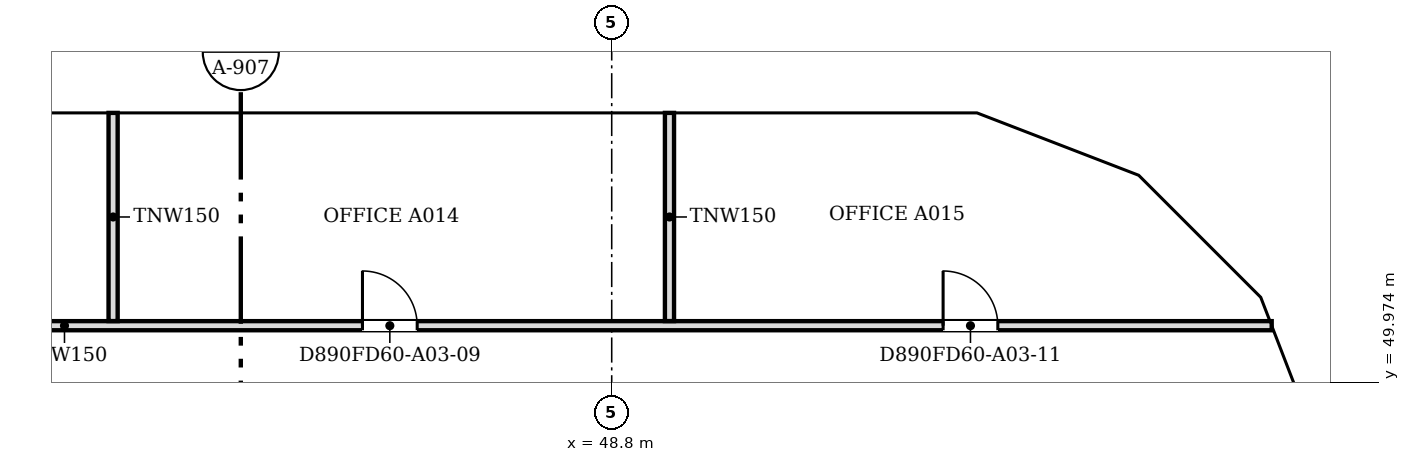
"""IFC4 building model, lengths in metres.
Left out: names, types, materials, properties, quantities, classifications, styles, units other than length and angle.
Written with IfcOpenShell. Run it as: python <this file> out.ifc"""

import sys

from ifc_helpers import new_model, si_unit, direction, frame, frame_2d, origin, place, context, subcontext, project, spatial, polyline, rectangle, outline, extrude, faceted_brep, source, transform, mapped, element, fill, save


model = new_model("IFC4")
c1 = context("Model", 3, precision=1e-05, world=origin(), true_north=direction((0.0, 1.0)))
c2 = subcontext(c1, "Body", "Model", "MODEL_VIEW")
j1 = project(units=[si_unit("LENGTHUNIT", "METRE"), si_unit("PLANEANGLEUNIT", "RADIAN")], contexts=[c1])
p1 = place(None, origin())
s1 = spatial("IfcSite", under=j1, at=p1, CompositionType="ELEMENT")
p2 = place(p1, origin())
s2 = spatial("IfcBuilding", under=s1, at=p2, CompositionType="ELEMENT")
p3 = place(p2, frame((0.0, 0.0, 41.0)))
s3 = spatial("IfcBuildingStorey", under=s2, at=p3, CompositionType="ELEMENT", Elevation=41.0)
m1 = source(origin(), c2, "Body", "Brep", [
    faceted_brep([(2.95, -0.25, 0.0), (3.003, -0.25, 0.068), (3.003, -0.25, 7.532), (2.95, -0.25, 7.6), (0.0, -0.25, 3.8), (0.047, 0.25, 3.86), (2.898, 0.25, 7.532), (2.898, 0.25, 0.068), (0.047, 0.25, 3.74), (2.95, 0.0, 0.0), (2.95, 0.0, 7.6), (0.0, 0.0, 3.8)], [[[0, 1, 2, 3, 4]], [[5, 6, 7, 8]], [[1, 0, 9]], [[10, 3, 2]], [[6, 5, 11, 4, 3, 10]], [[8, 7, 9, 0, 4, 11]], [[8, 11, 5]], [[1, 9, 7, 6, 10, 2]]]),
])
p4 = place(p3, frame((60.75, 48.753, -3.8), z_axis=(0.0, 0.0, 1.0), x_axis=(-0.35992665181, 0.932980602862, 0.0)))
e1 = element("IfcWall", 1, at=p4, inside=s3, PredefinedType="SOLIDWALL", context=c2, shape_type="MappedRepresentation", body=[
    mapped(m1, transform((0.0, 0.0, 0.0), scale=1.0)),
])
m2 = source(origin(), c2, "Body", "SweptSolid", [
    extrude(outline(polyline([(2.75, 6.935), (0.316, 3.8), (2.75, 0.665), (2.75, 6.935)])), frame((0.0, 0.26, 0.0), z_axis=(0.0, -1.0, 0.0), x_axis=(1.0, 0.0, 0.0)), (0.0, 0.0, 1.0), 0.52),
])
p5 = place(p4, origin())
e2 = element("IfcOpeningElement", 2, at=p5, cuts=e1, PredefinedType="OPENING", context=c2, shape_type="MappedRepresentation", body=[
    mapped(m2, transform((0.0, 0.0, 0.0), scale=1.0)),
])
m3 = source(origin(), c2, "Body", "Brep", [
    faceted_brep([(0.053, -0.25, 0.0), (2.997, -0.25, 3.8), (0.053, -0.25, 7.6), (0.0, -0.25, 7.532), (0.0, -0.25, 0.068), (0.106, 0.25, 7.532), (2.944, 0.25, 3.868), (2.944, 0.25, 3.732), (0.106, 0.25, 0.068), (2.997, 0.0, 3.8), (0.053, 0.0, 0.0), (0.053, 0.0, 7.6)], [[[0, 1, 2, 3, 4]], [[5, 6, 7, 8]], [[8, 7, 9, 1, 0, 10]], [[6, 5, 11, 2, 1, 9]], [[3, 2, 11]], [[10, 0, 4]], [[8, 10, 4, 3, 11, 5]], [[9, 7, 6]]]),
])
p6 = place(p3, frame((59.726, 51.469, -3.8), z_axis=(0.0, 0.0, 1.0), x_axis=(-0.707106781187, 0.707106781187, 0.0)))
e3 = element("IfcWall", 3, at=p6, inside=s3, PredefinedType="SOLIDWALL", context=c2, shape_type="MappedRepresentation", body=[
    mapped(m3, transform((0.0, 0.0, 0.0), scale=1.0)),
])
m4 = source(origin(), c2, "Body", "SweptSolid", [
    extrude(outline(polyline([(0.253, 0.666), (2.681, 3.8), (0.253, 6.934), (0.253, 0.666)])), frame((0.0, 0.26, 0.0), z_axis=(0.0, -1.0, 0.0), x_axis=(1.0, 0.0, 0.0)), (0.0, 0.0, 1.0), 0.52),
])
p7 = place(p6, origin())
e4 = element("IfcOpeningElement", 4, at=p7, cuts=e3, PredefinedType="OPENING", context=c2, shape_type="MappedRepresentation", body=[
    mapped(m4, transform((0.0, 0.0, 0.0), scale=1.0)),
])
m5 = source(origin(), c2, "Body", "Brep", [
    faceted_brep([(2.95, -0.25, 0.0), (2.997, -0.25, 0.059), (2.997, -0.25, 7.541), (2.95, -0.25, 7.6), (0.0, -0.25, 3.8), (0.053, 0.25, 3.868), (2.904, 0.25, 7.54), (2.904, 0.25, 0.06), (0.053, 0.25, 3.732), (2.95, 0.0, 0.0), (2.95, 0.0, 7.6), (0.0, 0.0, 3.8)], [[[0, 1, 2, 3, 4]], [[5, 6, 7, 8]], [[1, 0, 9]], [[10, 3, 2]], [[6, 5, 11, 4, 3, 10]], [[8, 7, 9, 0, 4, 11]], [[8, 11, 5]], [[1, 9, 7, 6, 10, 2]]]),
])
p8 = place(p3, frame((57.606, 53.588, -3.8), z_axis=(0.0, 0.0, 1.0), x_axis=(-0.932990326376, 0.359901446078, 0.0)))
e5 = element("IfcWall", 5, at=p8, inside=s3, PredefinedType="SOLIDWALL", context=c2, shape_type="MappedRepresentation", body=[
    mapped(m5, transform((0.0, 0.0, 0.0), scale=1.0)),
])
p9 = place(p8, origin())
e6 = element("IfcOpeningElement", 6, at=p9, cuts=e5, PredefinedType="OPENING", context=c2, shape_type="MappedRepresentation", body=[
    mapped(m2, transform((0.0, 0.0, 0.0), scale=1.0)),
])
m6 = source(origin(), c2, "Body", "Brep", [
    faceted_brep([(0.047, -0.25, 0.0), (3.05, -0.25, 3.8), (0.047, -0.25, 7.6), (0.0, -0.25, 7.54), (0.0, -0.25, 0.06), (0.093, 0.25, 7.541), (3.05, 0.25, 3.8), (0.093, 0.25, 0.059), (0.047, 0.0, 0.0), (0.047, 0.0, 7.6)], [[[0, 1, 2, 3, 4]], [[5, 6, 7]], [[7, 6, 1, 0, 8]], [[6, 5, 9, 2, 1]], [[3, 2, 9]], [[8, 0, 4]], [[7, 8, 4, 3, 9, 5]]]),
])
p10 = place(p3, frame((54.9, 54.65, -3.8), z_axis=(0.0, 0.0, 1.0), x_axis=(-1.0, 0.0, 0.0)))
e7 = element("IfcWall", 7, at=p10, inside=s3, PredefinedType="SOLIDWALL", context=c2, shape_type="MappedRepresentation", body=[
    mapped(m6, transform((0.0, 0.0, 0.0), scale=1.0)),
])
m7 = source(origin(), c2, "Body", "SweptSolid", [
    extrude(outline(polyline([(0.247, 0.656), (2.731, 3.8), (0.247, 6.944), (0.247, 0.656)])), frame((0.0, 0.26, 0.0), z_axis=(0.0, -1.0, 0.0), x_axis=(1.0, 0.0, 0.0)), (0.0, 0.0, 1.0), 0.52),
])
p11 = place(p10, origin())
e8 = element("IfcOpeningElement", 8, at=p11, cuts=e7, PredefinedType="OPENING", context=c2, shape_type="MappedRepresentation", body=[
    mapped(m7, transform((0.0, 0.0, 0.0), scale=1.0)),
])
m8 = source(origin(), c2, "Body", "SweptSolid", [
    extrude(outline(polyline([(3.05, 0.0), (6.1, 3.8), (3.05, 7.6), (0.0, 3.8), (3.05, 0.0)])), frame((0.0, 0.25, 0.0), z_axis=(0.0, -1.0, 0.0), x_axis=(1.0, 0.0, 0.0)), (0.0, 0.0, 1.0), 0.5),
])
p12 = place(p3, frame((51.85, 54.65, -3.8), z_axis=(0.0, 0.0, 1.0), x_axis=(-1.0, 0.0, 0.0)))
e9 = element("IfcWall", 9, at=p12, inside=s3, PredefinedType="SOLIDWALL", context=c2, shape_type="MappedRepresentation", body=[
    mapped(m8, transform((0.0, 0.0, 0.0), scale=1.0)),
])
m9 = source(origin(), c2, "Body", "SweptSolid", [
    extrude(outline(polyline([(3.05, 0.399), (5.78, 3.8), (3.05, 7.201), (0.321, 3.8), (3.05, 0.399)])), frame((0.0, 0.26, 0.0), z_axis=(0.0, -1.0, 0.0), x_axis=(1.0, 0.0, 0.0)), (0.0, 0.0, 1.0), 0.52),
])
p13 = place(p12, origin())
e10 = element("IfcOpeningElement", 10, at=p13, cuts=e9, PredefinedType="OPENING", context=c2, shape_type="MappedRepresentation", body=[
    mapped(m9, transform((0.0, 0.0, 0.0), scale=1.0)),
])
p14 = place(p3, frame((45.75, 54.65, -3.8), z_axis=(0.0, 0.0, 1.0), x_axis=(-1.0, 0.0, 0.0)))
e11 = element("IfcWall", 11, at=p14, inside=s3, PredefinedType="SOLIDWALL", context=c2, shape_type="MappedRepresentation", body=[
    mapped(m8, transform((0.0, 0.0, 0.0), scale=1.0)),
])
p15 = place(p14, origin())
e12 = element("IfcOpeningElement", 12, at=p15, cuts=e11, PredefinedType="OPENING", context=c2, shape_type="MappedRepresentation", body=[
    mapped(m9, transform((0.0, 0.0, 0.0), scale=1.0)),
])
m10 = source(origin(), c2, "Body", "Brep", [
    faceted_brep([(3.05, -0.25, 0.0), (6.1, -0.25, 3.8), (6.1, -0.25, 3.8), (3.05, -0.25, 7.6), (0.0, -0.25, 3.8), (0.0, 0.25, 3.8), (3.05, 0.25, 7.6), (6.1, 0.25, 3.8), (6.1, 0.25, 3.8), (3.05, 0.25, 0.0)], [[[0, 1, 2, 3, 4]], [[5, 6, 7, 8, 9]], [[9, 8, 1, 0]], [[7, 6, 3, 2]], [[6, 5, 4, 3]], [[5, 9, 0, 4]], [[1, 8, 7, 2]]]),
])
p16 = place(p3, frame((39.65, 54.65, -3.8), z_axis=(0.0, 0.0, 1.0), x_axis=(-1.0, 0.0, 0.0)))
e13 = element("IfcWall", 13, at=p16, inside=s3, PredefinedType="SOLIDWALL", context=c2, shape_type="MappedRepresentation", body=[
    mapped(m10, transform((0.0, 0.0, 0.0), scale=1.0)),
])
p17 = place(p16, origin())
e14 = element("IfcOpeningElement", 14, at=p17, cuts=e13, PredefinedType="OPENING", context=c2, shape_type="MappedRepresentation", body=[
    mapped(m9, transform((0.0, 0.0, 0.0), scale=1.0)),
])
p18 = place(p2, frame((0.0, 0.0, 44.8)))
s4 = spatial("IfcBuildingStorey", under=s2, at=p18, CompositionType="ELEMENT", Elevation=44.8)
m11 = source(origin(), c2, "Body", "Brep", [
    faceted_brep([(0.047, -0.25, 0.0), (2.997, -0.25, 3.8), (0.047, -0.25, 7.6), (0.0, -0.25, 7.541), (0.0, -0.25, 0.059), (0.093, 0.25, 7.54), (2.944, 0.25, 3.868), (2.944, 0.25, 3.732), (0.093, 0.25, 0.06), (2.997, 0.0, 3.8), (0.047, 0.0, 0.0), (0.047, 0.0, 7.6)], [[[0, 1, 2, 3, 4]], [[5, 6, 7, 8]], [[8, 7, 9, 1, 0, 10]], [[6, 5, 11, 2, 1, 9]], [[3, 2, 11]], [[10, 0, 4]], [[8, 10, 4, 3, 11, 5]], [[9, 7, 6]]]),
])
p19 = place(p18, frame((60.767, 48.71, -3.8), z_axis=(0.0, 0.0, 1.0), x_axis=(-0.359901446078, 0.932990326376, 0.0)))
e15 = element("IfcWall", 15, at=p19, inside=s4, PredefinedType="SOLIDWALL", context=c2, shape_type="MappedRepresentation", body=[
    mapped(m11, transform((0.0, 0.0, 0.0), scale=1.0)),
])
m12 = source(origin(), c2, "Body", "SweptSolid", [
    extrude(outline(polyline([(0.247, 0.665), (2.681, 3.8), (0.247, 6.935), (0.247, 0.665)])), frame((0.0, 0.26, 0.0), z_axis=(0.0, -1.0, 0.0), x_axis=(1.0, 0.0, 0.0)), (0.0, 0.0, 1.0), 0.52),
])
p20 = place(p19, origin())
e16 = element("IfcOpeningElement", 16, at=p20, cuts=e15, PredefinedType="OPENING", context=c2, shape_type="MappedRepresentation", body=[
    mapped(m12, transform((0.0, 0.0, 0.0), scale=1.0)),
])
m13 = source(origin(), c2, "Body", "Brep", [
    faceted_brep([(2.944, -0.25, 0.0), (2.997, -0.25, 0.068), (2.997, -0.25, 7.532), (2.944, -0.25, 7.6), (0.0, -0.25, 3.8), (0.053, 0.25, 3.868), (2.891, 0.25, 7.532), (2.891, 0.25, 0.068), (0.053, 0.25, 3.732), (2.944, 0.0, 0.0), (2.944, 0.0, 7.6), (0.0, 0.0, 3.8)], [[[0, 1, 2, 3, 4]], [[5, 6, 7, 8]], [[1, 0, 9]], [[10, 3, 2]], [[6, 5, 11, 4, 3, 10]], [[8, 7, 9, 0, 4, 11]], [[8, 11, 5]], [[1, 9, 7, 6, 10, 2]]]),
])
p21 = place(p18, frame((59.688, 51.506, -3.8), z_axis=(0.0, 0.0, 1.0), x_axis=(-0.707106781187, 0.707106781187, 0.0)))
e17 = element("IfcWall", 17, at=p21, inside=s4, PredefinedType="SOLIDWALL", context=c2, shape_type="MappedRepresentation", body=[
    mapped(m13, transform((0.0, 0.0, 0.0), scale=1.0)),
])
m14 = source(origin(), c2, "Body", "SweptSolid", [
    extrude(outline(polyline([(2.744, 6.934), (0.316, 3.8), (2.744, 0.666), (2.744, 6.934)])), frame((0.0, 0.26, 0.0), z_axis=(0.0, -1.0, 0.0), x_axis=(1.0, 0.0, 0.0)), (0.0, 0.0, 1.0), 0.52),
])
p22 = place(p21, origin())
e18 = element("IfcOpeningElement", 18, at=p22, cuts=e17, PredefinedType="OPENING", context=c2, shape_type="MappedRepresentation", body=[
    mapped(m14, transform((0.0, 0.0, 0.0), scale=1.0)),
])
m15 = source(origin(), c2, "Body", "Brep", [
    faceted_brep([(0.053, -0.25, 0.0), (3.003, -0.25, 3.8), (0.053, -0.25, 7.6), (0.0, -0.25, 7.532), (0.0, -0.25, 0.068), (0.106, 0.25, 7.532), (2.957, 0.25, 3.86), (2.957, 0.25, 3.74), (0.106, 0.25, 0.068), (3.003, 0.0, 3.8), (0.053, 0.0, 0.0), (0.053, 0.0, 7.6)], [[[0, 1, 2, 3, 4]], [[5, 6, 7, 8]], [[8, 7, 9, 1, 0, 10]], [[6, 5, 11, 2, 1, 9]], [[3, 2, 11]], [[10, 0, 4]], [[8, 10, 4, 3, 11, 5]], [[9, 7, 6]]]),
])
p23 = place(p18, frame((57.656, 53.569, -3.8), z_axis=(0.0, 0.0, 1.0), x_axis=(-0.933007896601, 0.359855894603, 0.0)))
e19 = element("IfcWall", 19, at=p23, inside=s4, PredefinedType="SOLIDWALL", context=c2, shape_type="MappedRepresentation", body=[
    mapped(m15, transform((0.0, 0.0, 0.0), scale=1.0)),
])
m16 = source(origin(), c2, "Body", "SweptSolid", [
    extrude(outline(polyline([(0.253, 0.665), (2.687, 3.8), (0.253, 6.935), (0.253, 0.665)])), frame((0.0, 0.26, 0.0), z_axis=(0.0, -1.0, 0.0), x_axis=(1.0, 0.0, 0.0)), (0.0, 0.0, 1.0), 0.52),
])
p24 = place(p23, origin())
e20 = element("IfcOpeningElement", 20, at=p24, cuts=e19, PredefinedType="OPENING", context=c2, shape_type="MappedRepresentation", body=[
    mapped(m16, transform((0.0, 0.0, 0.0), scale=1.0)),
])
m17 = source(origin(), c2, "Body", "Brep", [
    faceted_brep([(3.003, -0.25, 0.0), (6.053, -0.25, 3.8), (3.003, -0.25, 7.6), (0.0, -0.25, 3.8), (0.047, 0.25, 3.859), (3.003, 0.25, 7.6), (6.053, 0.25, 3.8), (3.003, 0.25, 0.0), (0.047, 0.25, 3.741), (0.0, 0.0, 3.8)], [[[0, 1, 2, 3]], [[4, 5, 6, 7, 8]], [[7, 6, 1, 0]], [[6, 5, 2, 1]], [[5, 4, 9, 3, 2]], [[8, 7, 0, 3, 9]], [[8, 9, 4]]]),
])
p25 = place(p18, frame((54.854, 54.65, -3.8), z_axis=(0.0, 0.0, 1.0), x_axis=(-1.0, 0.0, 0.0)))
e21 = element("IfcWall", 21, at=p25, inside=s4, PredefinedType="SOLIDWALL", context=c2, shape_type="MappedRepresentation", body=[
    mapped(m17, transform((0.0, 0.0, 0.0), scale=1.0)),
])
m18 = source(origin(), c2, "Body", "SweptSolid", [
    extrude(outline(polyline([(3.005, 0.401), (5.733, 3.8), (3.005, 7.199), (0.319, 3.8), (3.005, 0.401)])), frame((0.0, 0.26, 0.0), z_axis=(0.0, -1.0, 0.0), x_axis=(1.0, 0.0, 0.0)), (0.0, 0.0, 1.0), 0.52),
])
p26 = place(p25, origin())
e22 = element("IfcOpeningElement", 22, at=p26, cuts=e21, PredefinedType="OPENING", context=c2, shape_type="MappedRepresentation", body=[
    mapped(m18, transform((0.0, 0.0, 0.0), scale=1.0)),
])
p27 = place(p18, frame((48.8, 54.65, -3.8), z_axis=(0.0, 0.0, 1.0), x_axis=(-1.0, 0.0, 0.0)))
e23 = element("IfcWall", 23, at=p27, inside=s4, PredefinedType="SOLIDWALL", context=c2, shape_type="MappedRepresentation", body=[
    mapped(m8, transform((0.0, 0.0, 0.0), scale=1.0)),
])
p28 = place(p27, origin())
e24 = element("IfcOpeningElement", 24, at=p28, cuts=e23, PredefinedType="OPENING", context=c2, shape_type="MappedRepresentation", body=[
    mapped(m9, transform((0.0, 0.0, 0.0), scale=1.0)),
])
p29 = place(p18, frame((42.7, 54.65, -3.8), z_axis=(0.0, 0.0, 1.0), x_axis=(-1.0, 0.0, 0.0)))
e25 = element("IfcWall", 25, at=p29, inside=s4, PredefinedType="SOLIDWALL", context=c2, shape_type="MappedRepresentation", body=[
    mapped(m10, transform((0.0, 0.0, 0.0), scale=1.0)),
])
p30 = place(p29, origin())
e26 = element("IfcOpeningElement", 26, at=p30, cuts=e25, PredefinedType="OPENING", context=c2, shape_type="MappedRepresentation", body=[
    mapped(m9, transform((0.0, 0.0, 0.0), scale=1.0)),
])
p31 = place(p3, frame((28.4, 50.9, 0.0), z_axis=(0.0, 0.0, 1.0), x_axis=(1.0, 0.0, 0.0)))
e27 = element("IfcWall", 27, at=p31, inside=s3, PredefinedType="PARTITIONING", context=c2, shape_type="SweptSolid", body=[
    extrude(rectangle(XDim=31.254, YDim=0.15, at=frame_2d((15.627, 0.0))), origin(), (0.0, 0.0, 1.0), 3.067),
])
m19 = source(origin(), c2, "Body", "SweptSolid", [
    extrude(rectangle(XDim=0.9, YDim=2.1, at=frame_2d((0.45, 1.05))), frame((0.0, 0.085, 0.0), z_axis=(0.0, -1.0, 0.0), x_axis=(1.0, 0.0, 0.0)), (0.0, 0.0, 1.0), 0.17),
])
p32 = place(p31, frame((16.301, 0.0, 0.0)))
e28 = element("IfcOpeningElement", 28, at=p32, cuts=e27, PredefinedType="OPENING", context=c2, shape_type="MappedRepresentation", body=[
    mapped(m19, transform((0.0, 0.0, 0.0), scale=1.0)),
])
p33 = place(p31, frame((25.85, 0.0, 0.0)))
e29 = element("IfcOpeningElement", 29, at=p33, cuts=e27, PredefinedType="OPENING", context=c2, shape_type="MappedRepresentation", body=[
    mapped(m19, transform((0.0, 0.0, 0.0), scale=1.0)),
])
p34 = place(p31, frame((5.6, 0.0, 0.0)))
e30 = element("IfcOpeningElement", 30, at=p34, cuts=e27, PredefinedType="OPENING", context=c2, shape_type="MappedRepresentation", body=[
    mapped(m19, transform((0.0, 0.0, 0.0), scale=1.0)),
])
for number, where, z_axis, x_axis in (
    (31, (40.6, 50.976, 0.0), (0.0, 0.0, 1.0), (0.0, 1.0, 0.0)),
    (32, (49.75, 50.976, 0.0), (0.0, 0.0, 1.0), (0.0, 1.0, 0.0)),
):
    element("IfcWall", number, at=place(p3, frame(where, z_axis=z_axis, x_axis=x_axis)), inside=s3, PredefinedType="PARTITIONING", context=c2, shape_type="SweptSolid", body=[
        extrude(rectangle(XDim=3.424, YDim=0.15, at=frame_2d((1.712, 0.0))), origin(), (0.0, 0.0, 1.0), 3.067),
    ])
m20 = source(origin(), c2, "Body", "SweptSolid", [
    extrude(rectangle(XDim=0.9, YDim=2.1, at=frame_2d((0.45, 1.05))), frame((0.0, 0.025, 0.0), z_axis=(0.0, -1.0, 0.0), x_axis=(1.0, 0.0, 0.0)), (0.0, 0.0, 1.0), 0.05),
])
p35 = place(p32, origin())
e33 = element("IfcDoor", 33, at=p35, inside=s3, OperationType="SINGLE_SWING_LEFT", PredefinedType="DOOR", context=c2, shape_type="MappedRepresentation", body=[
    mapped(m20, transform((0.0, 0.0, 0.0), scale=1.0)),
])
fill(e28, e33)
p36 = place(p33, origin())
e34 = element("IfcDoor", 34, at=p36, inside=s3, OperationType="SINGLE_SWING_LEFT", PredefinedType="DOOR", context=c2, shape_type="MappedRepresentation", body=[
    mapped(m20, transform((0.0, 0.0, 0.0), scale=1.0)),
])
fill(e29, e34)
save(model, sys.argv[1])
